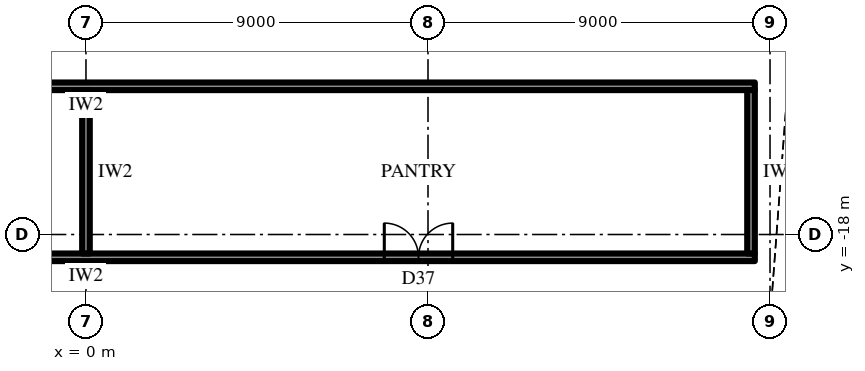
"""IFC4 building model, lengths in metres.
Left out: names, types, materials, properties, quantities, classifications, styles, units other than length and angle.
Written with IfcOpenShell. Run it as: python <this file> out.ifc"""

import sys

from ifc_helpers import new_model, si_unit, direction, frame, frame_2d, origin, place, context, subcontext, project, spatial, rectangle, extrude, element, fill, save


model = new_model("IFC4")
c1 = context("Model", 3, precision=1e-05, world=origin(), true_north=direction((0.0, 1.0)))
c2 = subcontext(c1, "Body", "Model", "MODEL_VIEW")
j1 = project(units=[si_unit("LENGTHUNIT", "METRE"), si_unit("PLANEANGLEUNIT", "RADIAN")], contexts=[c1])
p1 = place(None, origin())
s1 = spatial("IfcSite", under=j1, at=p1, CompositionType="ELEMENT")
p2 = place(p1, origin())
s2 = spatial("IfcBuilding", under=s1, at=p2, CompositionType="ELEMENT")
p3 = place(p2, frame((0.0, 0.0, 174.1)))
s3 = spatial("IfcBuildingStorey", under=s2, at=p3, CompositionType="ELEMENT", Elevation=174.1)
p4 = place(p3, frame((17.6, -14.1, 0.0), z_axis=(0.0, 0.0, 1.0), x_axis=(-1.0, 0.0, 0.0)))
e1 = element("IfcWall", 1, at=p4, inside=s3, PredefinedType="PARTITIONING", context=c2, shape_type="SweptSolid", body=[
    extrude(rectangle(XDim=35.2, YDim=0.2, at=frame_2d((17.6, 0.0))), origin(), (0.0, 0.0, 1.0), 4.0),
])
p5 = place(p3, frame((17.6, -18.6, 0.0), z_axis=(0.0, 0.0, 1.0), x_axis=(-1.0, 0.0, 0.0)))
e2 = element("IfcWall", 2, at=p5, inside=s3, PredefinedType="PARTITIONING", context=c2, shape_type="SweptSolid", body=[
    extrude(rectangle(XDim=35.2, YDim=0.2, at=frame_2d((17.6, 0.0))), origin(), (0.0, 0.0, 1.0), 4.0),
])
p6 = place(p5, frame((7.95, 0.0, 0.0)))
e3 = element("IfcOpeningElement", 3, at=p6, cuts=e2, PredefinedType="OPENING", context=c2, shape_type="SweptSolid", body=[
    extrude(rectangle(XDim=1.8, YDim=2.4, at=frame_2d((0.9, 1.2))), frame((0.0, 0.11, 0.0), z_axis=(0.0, -1.0, 0.0), x_axis=(1.0, 0.0, 0.0)), (0.0, 0.0, 1.0), 0.22),
])
p7 = place(p5, frame((25.45, 0.0, 0.0)))
e4 = element("IfcOpeningElement", 4, at=p7, cuts=e2, PredefinedType="OPENING", context=c2, shape_type="SweptSolid", body=[
    extrude(rectangle(XDim=1.8, YDim=2.4, at=frame_2d((0.9, 1.2))), frame((0.0, 0.11, 0.0), z_axis=(0.0, -1.0, 0.0), x_axis=(1.0, 0.0, 0.0)), (0.0, 0.0, 1.0), 0.22),
])
p8 = place(p3, frame((17.5, -14.2, 0.0), z_axis=(0.0, 0.0, 1.0), x_axis=(0.0, -1.0, 0.0)))
e5 = element("IfcWall", 5, at=p8, inside=s3, PredefinedType="PARTITIONING", context=c2, shape_type="SweptSolid", body=[
    extrude(rectangle(XDim=4.3, YDim=0.2, at=frame_2d((2.15, 0.0))), origin(), (0.0, 0.0, 1.0), 4.0),
])
p9 = place(p3, frame((0.0, -14.2, 0.0), z_axis=(0.0, 0.0, 1.0), x_axis=(0.0, -1.0, 0.0)))
e6 = element("IfcWall", 6, at=p9, inside=s3, PredefinedType="PARTITIONING", context=c2, shape_type="SweptSolid", body=[
    extrude(rectangle(XDim=4.3, YDim=0.2, at=frame_2d((2.15, 0.0))), origin(), (0.0, 0.0, 1.0), 2.992),
])
p10 = place(p6, frame((1.8, 0.0, 0.0), z_axis=(0.0, 0.0, 1.0), x_axis=(-1.0, 0.0, 0.0)))
e7 = element("IfcDoor", 7, at=p10, inside=s3, OperationType="DOUBLE_DOOR_SINGLE_SWING", PredefinedType="DOOR", context=c2, shape_type="SweptSolid", body=[
    extrude(rectangle(XDim=1.8, YDim=2.4, at=frame_2d((0.9, 1.2))), frame((0.0, 0.025, 0.0), z_axis=(0.0, -1.0, 0.0), x_axis=(1.0, 0.0, 0.0)), (0.0, 0.0, 1.0), 0.05),
])
fill(e3, e7)
save(model, sys.argv[1])
